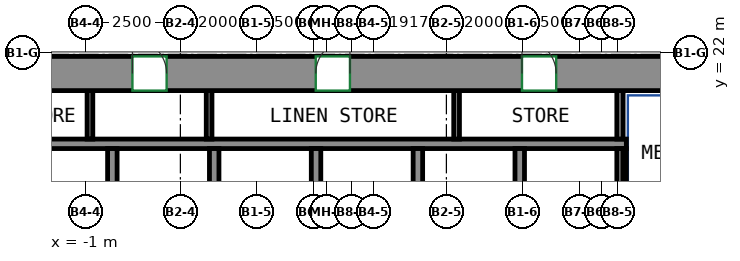
"""IFC4 building model, lengths in metres.
Left out: names, types, materials, properties, quantities, classifications, styles, units other than length and angle.
Written with IfcOpenShell. Run it as: python <this file> out.ifc"""

import sys

from ifc_helpers import new_model, si_unit, direction, frame, frame_2d, origin, place, context, subcontext, project, spatial, rectangle, extrude, source, transform, mapped, element, fill, save


model = new_model("IFC4")
c1 = context("Model", 3, precision=1e-05, world=origin(), true_north=direction((0.0, 1.0)))
c2 = subcontext(c1, "Body", "Model", "MODEL_VIEW")
j1 = project(units=[si_unit("LENGTHUNIT", "METRE"), si_unit("PLANEANGLEUNIT", "RADIAN")], contexts=[c1])
p1 = place(None, origin())
s1 = spatial("IfcSite", under=j1, at=p1, CompositionType="ELEMENT")
p2 = place(p1, origin())
s2 = spatial("IfcBuilding", under=s1, at=p2, CompositionType="ELEMENT")
p3 = place(p2, frame((0.0, 0.0, 100.6)))
s3 = spatial("IfcBuildingStorey", under=s2, at=p3, CompositionType="ELEMENT", Elevation=100.6)
m1 = source(origin(), c2, "Body", "SweptSolid", [
    extrude(rectangle(XDim=33.9, YDim=0.9, at=frame_2d((16.95, 0.0))), origin(), (0.0, 0.0, 1.0), 3.72),
])
p4 = place(p3, frame((-15.9, 21.45, 0.0), z_axis=(0.0, 0.0, 1.0), x_axis=(1.0, 0.0, 0.0)))
e1 = element("IfcWall", 1, at=p4, inside=s3, PredefinedType="SHEAR", context=c2, shape_type="MappedRepresentation", body=[
    mapped(m1, transform((0.0, 0.0, 0.0))),
])
p5 = place(p4, frame((6.008, 0.0, 0.0)))
e2 = element("IfcOpeningElement", 2, at=p5, cuts=e1, PredefinedType="OPENING", context=c2, shape_type="SweptSolid", body=[
    extrude(rectangle(XDim=0.9, YDim=2.1, at=frame_2d((0.45, 1.05))), frame((0.0, 0.46, 0.0), z_axis=(0.0, -1.0, 0.0), x_axis=(1.0, 0.0, 0.0)), (0.0, 0.0, 1.0), 0.92),
])
p6 = place(p4, frame((8.688, 0.0, 0.0)))
e3 = element("IfcOpeningElement", 3, at=p6, cuts=e1, PredefinedType="OPENING", context=c2, shape_type="SweptSolid", body=[
    extrude(rectangle(XDim=0.9, YDim=2.1, at=frame_2d((0.45, 1.05))), frame((0.0, 0.46, 0.0), z_axis=(0.0, -1.0, 0.0), x_axis=(1.0, 0.0, 0.0)), (0.0, 0.0, 1.0), 0.92),
])
p7 = place(p4, frame((12.185, 0.0, 0.0)))
e4 = element("IfcOpeningElement", 4, at=p7, cuts=e1, PredefinedType="OPENING", context=c2, shape_type="SweptSolid", body=[
    extrude(rectangle(XDim=0.9, YDim=2.1, at=frame_2d((0.45, 1.05))), frame((0.0, 0.46, 0.0), z_axis=(0.0, -1.0, 0.0), x_axis=(1.0, 0.0, 0.0)), (0.0, 0.0, 1.0), 0.92),
])
p8 = place(p4, frame((16.138, 0.0, 0.0)))
e5 = element("IfcOpeningElement", 5, at=p8, cuts=e1, PredefinedType="OPENING", context=c2, shape_type="SweptSolid", body=[
    extrude(rectangle(XDim=0.9, YDim=2.1, at=frame_2d((0.45, 1.05))), frame((0.0, 0.46, 0.0), z_axis=(0.0, -1.0, 0.0), x_axis=(1.0, 0.0, 0.0)), (0.0, 0.0, 1.0), 0.92),
])
p9 = place(p4, frame((20.962, 0.0, 0.0)))
e6 = element("IfcOpeningElement", 6, at=p9, cuts=e1, PredefinedType="OPENING", context=c2, shape_type="SweptSolid", body=[
    extrude(rectangle(XDim=0.9, YDim=2.1, at=frame_2d((0.45, 1.05))), frame((0.0, 0.46, 0.0), z_axis=(0.0, -1.0, 0.0), x_axis=(1.0, 0.0, 0.0)), (0.0, 0.0, 1.0), 0.92),
])
p10 = place(p4, frame((26.389, 0.0, 0.0)))
e7 = element("IfcOpeningElement", 7, at=p10, cuts=e1, PredefinedType="OPENING", context=c2, shape_type="SweptSolid", body=[
    extrude(rectangle(XDim=0.9, YDim=2.1, at=frame_2d((0.45, 1.05))), frame((0.0, 0.46, 0.0), z_axis=(0.0, -1.0, 0.0), x_axis=(1.0, 0.0, 0.0)), (0.0, 0.0, 1.0), 0.92),
])
p11 = place(p4, frame((2.425, 0.0, 0.0)))
e8 = element("IfcOpeningElement", 8, at=p11, cuts=e1, PredefinedType="OPENING", context=c2, shape_type="SweptSolid", body=[
    extrude(rectangle(XDim=0.9, YDim=2.1, at=frame_2d((0.45, 1.05))), frame((0.0, 0.46, 0.0), z_axis=(0.0, -1.0, 0.0), x_axis=(1.0, 0.0, 0.0)), (0.0, 0.0, 1.0), 0.92),
])
p12 = place(p4, frame((30.575, 0.0, 0.0)))
e9 = element("IfcOpeningElement", 9, at=p12, cuts=e1, PredefinedType="OPENING", context=c2, shape_type="SweptSolid", body=[
    extrude(rectangle(XDim=0.9, YDim=2.1, at=frame_2d((0.45, 1.05))), frame((0.0, 0.46, 0.0), z_axis=(0.0, -1.0, 0.0), x_axis=(1.0, 0.0, 0.0)), (0.0, 0.0, 1.0), 0.92),
])
m2 = source(origin(), c2, "Body", "SweptSolid", [
    extrude(rectangle(XDim=19.01, YDim=0.25, at=frame_2d((9.505, 0.0))), origin(), (0.0, 0.0, 1.0), 3.72),
])
p13 = place(p3, frame((-5.775, 19.6, 0.0), z_axis=(0.0, 0.0, 1.0), x_axis=(1.0, 0.0, 0.0)))
e10 = element("IfcWall", 10, at=p13, inside=s3, PredefinedType="PARTITIONING", context=c2, shape_type="MappedRepresentation", body=[
    mapped(m2, transform((0.0, 0.0, 0.0))),
])
m3 = source(origin(), c2, "Body", "SweptSolid", [
    extrude(rectangle(XDim=3.275, YDim=0.165, at=frame_2d((1.638, 0.0))), origin(), (0.0, 0.0, 1.0), 3.72),
])
p14 = place(p3, frame((13.067, 16.2, 0.0), z_axis=(0.0, 0.0, 1.0), x_axis=(0.0, 1.0, 0.0)))
e11 = element("IfcWall", 11, at=p14, inside=s3, PredefinedType="PARTITIONING", context=c2, shape_type="MappedRepresentation", body=[
    mapped(m3, transform((0.0, 0.0, 0.0))),
])
m4 = source(origin(), c2, "Body", "SweptSolid", [
    extrude(rectangle(XDim=1.275, YDim=0.165, at=frame_2d((0.637, 0.0))), origin(), (0.0, 0.0, 1.0), 3.72),
])
p15 = place(p3, frame((13.067, 19.725, 0.0), z_axis=(0.0, 0.0, 1.0), x_axis=(0.0, 1.0, 0.0)))
e12 = element("IfcWall", 12, at=p15, inside=s3, PredefinedType="PARTITIONING", context=c2, shape_type="MappedRepresentation", body=[
    mapped(m4, transform((0.0, 0.0, 0.0))),
])
m5 = source(origin(), c2, "Body", "SweptSolid", [
    extrude(rectangle(XDim=3.275, YDim=0.25, at=frame_2d((1.638, 0.0))), origin(), (0.0, 0.0, 1.0), 3.72),
])
p16 = place(p3, frame((10.43, 16.2, 0.0), z_axis=(0.0, 0.0, 1.0), x_axis=(0.0, 1.0, 0.0)))
e13 = element("IfcWall", 13, at=p16, inside=s3, PredefinedType="PARTITIONING", context=c2, shape_type="MappedRepresentation", body=[
    mapped(m5, transform((0.0, 0.0, 0.0))),
])
m6 = source(origin(), c2, "Body", "SweptSolid", [
    extrude(rectangle(XDim=2.725, YDim=0.085, at=frame_2d((1.363, 0.0))), origin(), (0.0, 0.0, 1.0), 3.72),
])
p17 = place(p3, frame((13.192, 16.75, 0.0), z_axis=(0.0, 0.0, 1.0), x_axis=(0.0, 1.0, 0.0)))
e14 = element("IfcWall", 14, at=p17, inside=s3, PredefinedType="PARTITIONING", context=c2, shape_type="MappedRepresentation", body=[
    mapped(m6, transform((0.0, 0.0, 0.0))),
])
for number, where, z_axis, x_axis in (
    (15, (2.39, 16.2, 0.0), (0.0, 0.0, 1.0), (0.0, 1.0, 0.0)),
    (16, (5.07, 16.2, 0.0), (0.0, 0.0, 1.0), (0.0, 1.0, 0.0)),
    (17, (7.75, 16.2, 0.0), (0.0, 0.0, 1.0), (0.0, 1.0, 0.0)),
    (18, (-0.29, 16.2, 0.0), (0.0, 0.0, 1.0), (0.0, 1.0, 0.0)),
):
    element("IfcWall", number, at=place(p3, frame(where, z_axis=z_axis, x_axis=x_axis)), inside=s3, PredefinedType="PARTITIONING", context=c2, shape_type="MappedRepresentation", body=[
        mapped(m5, transform((0.0, 0.0, 0.0))),
    ])
m7 = source(origin(), c2, "Body", "SweptSolid", [
    extrude(rectangle(XDim=1.275, YDim=0.15, at=frame_2d((0.637, 0.0))), origin(), (0.0, 0.0, 1.0), 3.72),
])
for number, where, z_axis, x_axis in (
    (19, (-0.88, 19.725, 0.0), (0.0, 0.0, 1.0), (0.0, 1.0, 0.0)),
    (20, (2.256, 19.725, 0.0), (0.0, 0.0, 1.0), (0.0, 1.0, 0.0)),
    (21, (8.768, 19.725, 0.0), (0.0, 0.0, 1.0), (0.0, 1.0, 0.0)),
):
    element("IfcWall", number, at=place(p3, frame(where, z_axis=z_axis, x_axis=x_axis)), inside=s3, PredefinedType="PARTITIONING", context=c2, shape_type="MappedRepresentation", body=[
        mapped(m7, transform((0.0, 0.0, 0.0))),
    ])
p18 = place(p8, origin())
e22 = element("IfcDoor", 22, at=p18, inside=s3, OperationType="SINGLE_SWING_LEFT", PredefinedType="DOOR", context=c2, shape_type="SweptSolid", body=[
    extrude(rectangle(XDim=0.9, YDim=2.1, at=frame_2d((0.45, 1.05))), frame((0.0, -0.305, 0.0), z_axis=(0.0, -1.0, 0.0), x_axis=(1.0, 0.0, 0.0)), (0.0, 0.0, 1.0), 0.05),
])
fill(e5, e22)
p19 = place(p9, origin())
e23 = element("IfcDoor", 23, at=p19, inside=s3, OperationType="SINGLE_SWING_RIGHT", PredefinedType="DOOR", context=c2, shape_type="SweptSolid", body=[
    extrude(rectangle(XDim=0.9, YDim=2.1, at=frame_2d((0.45, 1.05))), frame((0.0, -0.305, 0.0), z_axis=(0.0, -1.0, 0.0), x_axis=(1.0, 0.0, 0.0)), (0.0, 0.0, 1.0), 0.05),
])
fill(e6, e23)
p20 = place(p10, origin())
e24 = element("IfcDoor", 24, at=p20, inside=s3, OperationType="SINGLE_SWING_LEFT", PredefinedType="DOOR", context=c2, shape_type="SweptSolid", body=[
    extrude(rectangle(XDim=0.9, YDim=2.1, at=frame_2d((0.45, 1.05))), frame((0.0, -0.305, 0.0), z_axis=(0.0, -1.0, 0.0), x_axis=(1.0, 0.0, 0.0)), (0.0, 0.0, 1.0), 0.05),
])
fill(e7, e24)
save(model, sys.argv[1])
